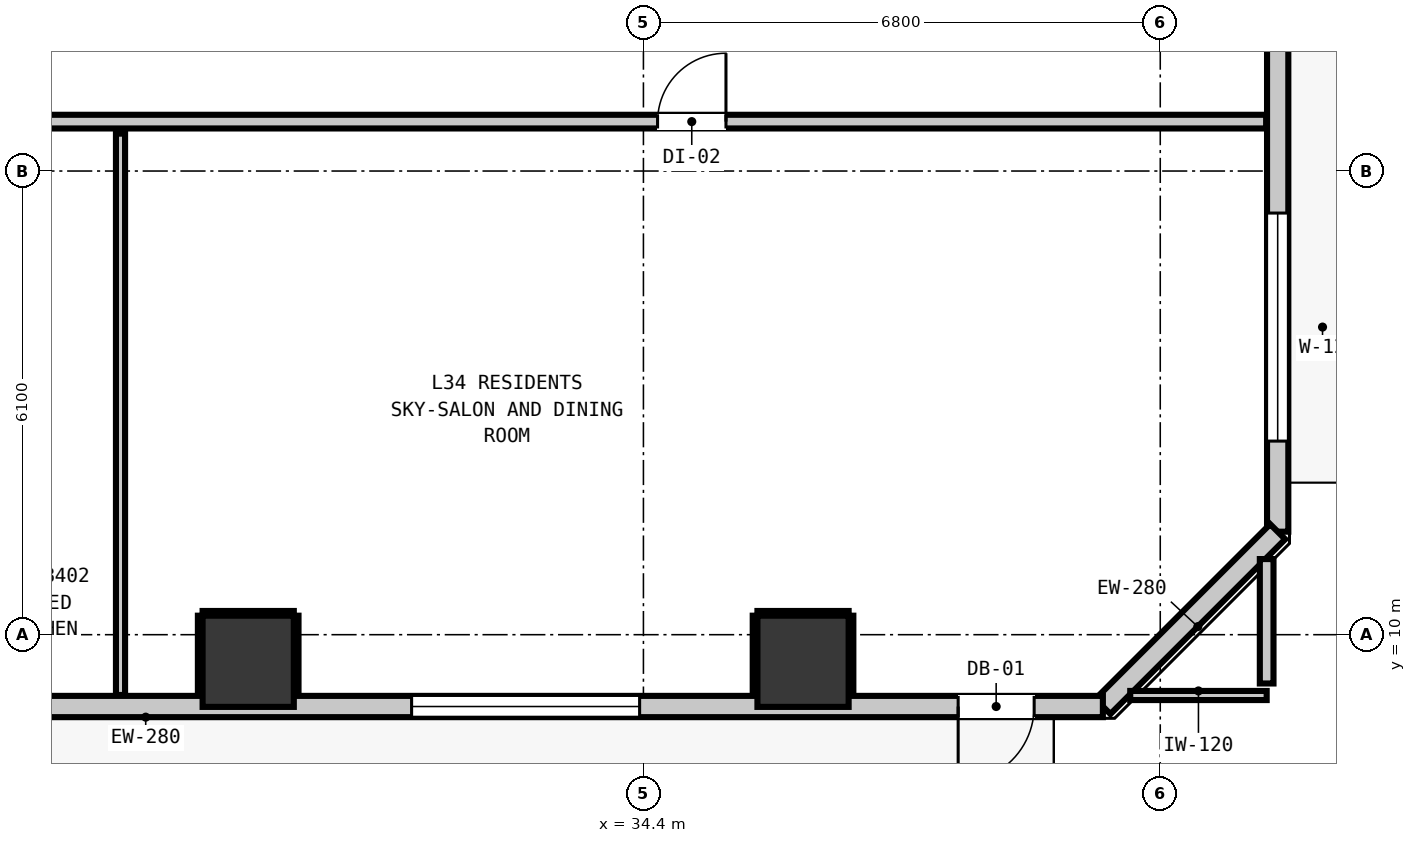
"""IFC4 building model, lengths in metres.
Left out: names, types, materials, properties, quantities, classifications, styles, units other than length and angle.
Written with IfcOpenShell. Run it as: python <this file> out.ifc"""

import sys

from ifc_helpers import new_model, si_unit, direction, frame, frame_2d, origin, origin_2d, place, context, subcontext, project, spatial, rectangle, extrude, element, fill, save


model = new_model("IFC4")
c1 = context("Model", 3, precision=1e-05, world=origin(), true_north=direction((0.0, 1.0)))
c2 = subcontext(c1, "Body", "Model", "MODEL_VIEW")
j1 = project(units=[si_unit("LENGTHUNIT", "METRE"), si_unit("PLANEANGLEUNIT", "RADIAN")], contexts=[c1])
p1 = place(None, origin())
s1 = spatial("IfcSite", under=j1, at=p1, CompositionType="ELEMENT")
p2 = place(p1, origin())
s2 = spatial("IfcBuilding", under=s1, at=p2, CompositionType="ELEMENT")
p3 = place(p2, frame((0.0, 0.0, 119.36)))
s3 = spatial("IfcBuildingStorey", under=s2, at=p3, CompositionType="ELEMENT", Elevation=119.36)
for number, where, z_axis, x_axis in (
    (1, (29.2, 9.65, 0.0), (0.0, 0.0, 1.0), (1.0, 0.0, 0.0)),
    (2, (36.5, 9.65, 0.0), (0.0, 0.0, 1.0), (1.0, 0.0, 0.0)),
):
    element("IfcColumn", number, at=place(p3, frame(where, z_axis=z_axis, x_axis=x_axis)), inside=s3, PredefinedType="COLUMN", context=c2, shape_type="SweptSolid", body=[
        extrude(rectangle(XDim=1.2, YDim=1.2, at=origin_2d()), origin(), (0.0, 0.0, 1.0), 3.32),
    ])
p4 = place(p3, frame((42.745, 43.645, 0.0), z_axis=(0.0, 0.0, 1.0), x_axis=(0.0, -1.0, 0.0)))
e3 = element("IfcWall", 3, at=p4, inside=s3, PredefinedType="STANDARD", context=c2, shape_type="SweptSolid", body=[
    extrude(rectangle(XDim=32.29, YDim=0.28, at=frame_2d((16.145, 0.0))), origin(), (0.0, 0.0, 1.0), 3.08),
])
p5 = place(p4, frame((5.467, 0.0, 0.0)))
e4 = element("IfcOpeningElement", 4, at=p5, cuts=e3, PredefinedType="OPENING", context=c2, shape_type="SweptSolid", body=[
    extrude(rectangle(XDim=1.0, YDim=2.15, at=frame_2d((0.5, 1.075))), frame((0.0, 0.15, 0.0), z_axis=(0.0, -1.0, 0.0), x_axis=(1.0, 0.0, 0.0)), (0.0, 0.0, 1.0), 0.3),
])
p6 = place(p4, frame((28.098, 0.0, 0.85)))
e5 = element("IfcOpeningElement", 5, at=p6, cuts=e3, PredefinedType="OPENING", context=c2, shape_type="SweptSolid", body=[
    extrude(rectangle(XDim=3.0, YDim=2.1, at=frame_2d((1.5, 1.05))), frame((0.0, 0.15, 0.0), z_axis=(0.0, -1.0, 0.0), x_axis=(1.0, 0.0, 0.0)), (0.0, 0.0, 1.0), 0.3),
])
p7 = place(p4, frame((0.318, 0.0, 0.85)))
e6 = element("IfcOpeningElement", 6, at=p7, cuts=e3, PredefinedType="OPENING", context=c2, shape_type="SweptSolid", body=[
    extrude(rectangle(XDim=1.05, YDim=1.65, at=frame_2d((0.525, 0.825))), frame((0.0, 0.15, 0.0), z_axis=(0.0, -1.0, 0.0), x_axis=(1.0, 0.0, 0.0)), (0.0, 0.0, 1.0), 0.3),
])
p8 = place(p4, frame((14.883, 0.0, 0.85)))
e7 = element("IfcOpeningElement", 7, at=p8, cuts=e3, PredefinedType="OPENING", context=c2, shape_type="SweptSolid", body=[
    extrude(rectangle(XDim=3.0, YDim=2.1, at=frame_2d((1.5, 1.05))), frame((0.0, 0.15, 0.0), z_axis=(0.0, -1.0, 0.0), x_axis=(1.0, 0.0, 0.0)), (0.0, 0.0, 1.0), 0.3),
])
p9 = place(p3, frame((42.745, 11.355, 0.0), z_axis=(0.0, 0.0, 1.0), x_axis=(-0.707106781187, -0.707106781187, 0.0)))
e8 = element("IfcWall", 8, at=p9, inside=s3, PredefinedType="STANDARD", context=c2, shape_type="SweptSolid", body=[
    extrude(rectangle(XDim=3.253, YDim=0.28, at=frame_2d((1.626, 0.0))), origin(), (0.0, 0.0, 1.0), 3.08),
])
p10 = place(p3, frame((40.445, 9.055, 0.0), z_axis=(0.0, 0.0, 1.0), x_axis=(-1.0, 0.0, 0.0)))
e9 = element("IfcWall", 9, at=p10, inside=s3, PredefinedType="STANDARD", context=c2, shape_type="SweptSolid", body=[
    extrude(rectangle(XDim=35.09, YDim=0.28, at=frame_2d((17.545, 0.0))), origin(), (0.0, 0.0, 1.0), 3.08),
])
p11 = place(p10, frame((0.904, 0.0, 0.0)))
e10 = element("IfcOpeningElement", 10, at=p11, cuts=e9, PredefinedType="OPENING", context=c2, shape_type="SweptSolid", body=[
    extrude(rectangle(XDim=1.0, YDim=2.15, at=frame_2d((0.5, 1.075))), frame((0.0, 0.15, 0.0), z_axis=(0.0, -1.0, 0.0), x_axis=(1.0, 0.0, 0.0)), (0.0, 0.0, 1.0), 0.3),
])
p12 = place(p10, frame((29.442, 0.0, 0.85)))
e11 = element("IfcOpeningElement", 11, at=p12, cuts=e9, PredefinedType="OPENING", context=c2, shape_type="SweptSolid", body=[
    extrude(rectangle(XDim=3.0, YDim=2.1, at=frame_2d((1.5, 1.05))), frame((0.0, 0.15, 0.0), z_axis=(0.0, -1.0, 0.0), x_axis=(1.0, 0.0, 0.0)), (0.0, 0.0, 1.0), 0.3),
])
p13 = place(p10, frame((33.654, 0.0, 0.85)))
e12 = element("IfcOpeningElement", 12, at=p13, cuts=e9, PredefinedType="OPENING", context=c2, shape_type="SweptSolid", body=[
    extrude(rectangle(XDim=1.05, YDim=1.65, at=frame_2d((0.525, 0.825))), frame((0.0, 0.15, 0.0), z_axis=(0.0, -1.0, 0.0), x_axis=(1.0, 0.0, 0.0)), (0.0, 0.0, 1.0), 0.3),
])
p14 = place(p10, frame((16.092, 0.0, 0.85)))
e13 = element("IfcOpeningElement", 13, at=p14, cuts=e9, PredefinedType="OPENING", context=c2, shape_type="SweptSolid", body=[
    extrude(rectangle(XDim=1.05, YDim=1.65, at=frame_2d((0.525, 0.825))), frame((0.0, 0.15, 0.0), z_axis=(0.0, -1.0, 0.0), x_axis=(1.0, 0.0, 0.0)), (0.0, 0.0, 1.0), 0.3),
])
p15 = place(p10, frame((20.765, 0.0, 0.85)))
e14 = element("IfcOpeningElement", 14, at=p15, cuts=e9, PredefinedType="OPENING", context=c2, shape_type="SweptSolid", body=[
    extrude(rectangle(XDim=3.0, YDim=2.1, at=frame_2d((1.5, 1.05))), frame((0.0, 0.15, 0.0), z_axis=(0.0, -1.0, 0.0), x_axis=(1.0, 0.0, 0.0)), (0.0, 0.0, 1.0), 0.3),
])
p16 = place(p10, frame((6.095, 0.0, 0.85)))
e15 = element("IfcOpeningElement", 15, at=p16, cuts=e9, PredefinedType="OPENING", context=c2, shape_type="SweptSolid", body=[
    extrude(rectangle(XDim=3.0, YDim=2.1, at=frame_2d((1.5, 1.05))), frame((0.0, 0.15, 0.0), z_axis=(0.0, -1.0, 0.0), x_axis=(1.0, 0.0, 0.0)), (0.0, 0.0, 1.0), 0.3),
])
p17 = place(p3, frame((3.207, 16.75, 0.0), z_axis=(0.0, 0.0, 1.0), x_axis=(1.0, 0.0, 0.0)))
e16 = element("IfcWall", 16, at=p17, inside=s3, PredefinedType="PARTITIONING", context=c2, shape_type="SweptSolid", body=[
    extrude(rectangle(XDim=39.386, YDim=0.18, at=frame_2d((19.693, 0.0))), origin(), (0.0, 0.0, 1.0), 3.08),
])
p18 = place(p17, frame((5.797, 0.0, 0.0)))
e17 = element("IfcOpeningElement", 17, at=p18, cuts=e16, PredefinedType="OPENING", context=c2, shape_type="SweptSolid", body=[
    extrude(rectangle(XDim=1.0, YDim=2.15, at=frame_2d((0.5, 1.075))), frame((0.0, 0.1, 0.0), z_axis=(0.0, -1.0, 0.0), x_axis=(1.0, 0.0, 0.0)), (0.0, 0.0, 1.0), 0.2),
])
p19 = place(p17, frame((20.121, 0.0, 0.0)))
e18 = element("IfcOpeningElement", 18, at=p19, cuts=e16, PredefinedType="OPENING", context=c2, shape_type="SweptSolid", body=[
    extrude(rectangle(XDim=1.0, YDim=2.15, at=frame_2d((0.5, 1.075))), frame((0.0, 0.1, 0.0), z_axis=(0.0, -1.0, 0.0), x_axis=(1.0, 0.0, 0.0)), (0.0, 0.0, 1.0), 0.2),
])
p20 = place(p17, frame((31.379, 0.0, 0.0)))
e19 = element("IfcOpeningElement", 19, at=p20, cuts=e16, PredefinedType="OPENING", context=c2, shape_type="SweptSolid", body=[
    extrude(rectangle(XDim=0.9, YDim=2.1, at=frame_2d((0.45, 1.05))), frame((0.0, 0.1, 0.0), z_axis=(0.0, -1.0, 0.0), x_axis=(1.0, 0.0, 0.0)), (0.0, 0.0, 1.0), 0.2),
])
p21 = place(p3, frame((40.805, 9.2, 0.0), z_axis=(0.0, 0.0, 1.0), x_axis=(1.0, 0.0, 0.0)))
e20 = element("IfcWall", 20, at=p21, inside=s3, PredefinedType="PARTITIONING", context=c2, shape_type="SweptSolid", body=[
    extrude(rectangle(XDim=1.795, YDim=0.12, at=frame_2d((0.897, 0.0))), origin(), (0.0, 0.0, 1.0), 3.08),
])
p22 = place(p3, frame((42.6, 9.358, 0.0), z_axis=(0.0, 0.0, 1.0), x_axis=(0.0, 1.0, 0.0)))
e21 = element("IfcWall", 21, at=p22, inside=s3, PredefinedType="PARTITIONING", context=c2, shape_type="SweptSolid", body=[
    extrude(rectangle(XDim=1.637, YDim=0.18, at=frame_2d((0.819, 0.0))), origin(), (0.0, 0.0, 1.0), 3.08),
])
p23 = place(p3, frame((27.52, 9.207, 0.0), z_axis=(0.0, 0.0, 1.0), x_axis=(0.0, 1.0, 0.0)))
e22 = element("IfcWall", 22, at=p23, inside=s3, PredefinedType="PARTITIONING", context=c2, shape_type="SweptSolid", body=[
    extrude(rectangle(XDim=7.385, YDim=0.12, at=frame_2d((3.692, 0.0))), origin(), (0.0, 0.0, 1.0), 3.08),
])
p24 = place(p3, frame((28.6, 10.282, 0.0), z_axis=(0.0, 0.0, 1.0), x_axis=(1.0, 0.0, 0.0)))
e23 = element("IfcWall", 23, at=p24, inside=s3, PredefinedType="PARTITIONING", context=c2, shape_type="SweptSolid", body=[
    extrude(rectangle(XDim=1.2, YDim=0.06, at=frame_2d((0.6, 0.0))), origin(), (0.0, 0.0, 1.0), 1.45),
])
for number, where, z_axis, x_axis in (
    (24, (28.568, 9.21, 0.0), (0.0, 0.0, 1.0), (0.0, 1.0, 0.0)),
    (25, (29.832, 9.21, 0.0), (0.0, 0.0, 1.0), (0.0, 1.0, 0.0)),
):
    element("IfcWall", number, at=place(p3, frame(where, z_axis=z_axis, x_axis=x_axis)), inside=s3, PredefinedType="PARTITIONING", context=c2, shape_type="SweptSolid", body=[
        extrude(rectangle(XDim=1.04, YDim=0.06, at=frame_2d((0.52, 0.0))), origin(), (0.0, 0.0, 1.0), 1.45),
    ])
p25 = place(p3, frame((35.9, 10.282, 0.0), z_axis=(0.0, 0.0, 1.0), x_axis=(1.0, 0.0, 0.0)))
e26 = element("IfcWall", 26, at=p25, inside=s3, PredefinedType="PARTITIONING", context=c2, shape_type="SweptSolid", body=[
    extrude(rectangle(XDim=1.2, YDim=0.06, at=frame_2d((0.6, 0.0))), origin(), (0.0, 0.0, 1.0), 1.45),
])
for number, where, z_axis, x_axis in (
    (27, (35.868, 9.21, 0.0), (0.0, 0.0, 1.0), (0.0, 1.0, 0.0)),
    (28, (37.132, 9.21, 0.0), (0.0, 0.0, 1.0), (0.0, 1.0, 0.0)),
):
    element("IfcWall", number, at=place(p3, frame(where, z_axis=z_axis, x_axis=x_axis)), inside=s3, PredefinedType="PARTITIONING", context=c2, shape_type="SweptSolid", body=[
        extrude(rectangle(XDim=1.04, YDim=0.06, at=frame_2d((0.52, 0.0))), origin(), (0.0, 0.0, 1.0), 1.45),
    ])
p26 = place(p11, origin())
e29 = element("IfcDoor", 29, at=p26, inside=s3, OperationType="SINGLE_SWING_RIGHT", PredefinedType="DOOR", context=c2, shape_type="SweptSolid", body=[
    extrude(rectangle(XDim=1.0, YDim=2.15, at=frame_2d((0.5, 1.075))), frame((0.0, 0.025, 0.0), z_axis=(0.0, -1.0, 0.0), x_axis=(1.0, 0.0, 0.0)), (0.0, 0.0, 1.0), 0.05),
])
fill(e10, e29)
p27 = place(p6, origin())
e30 = element("IfcWindow", 30, at=p27, inside=s3, PartitioningType="SINGLE_PANEL", PredefinedType="WINDOW", context=c2, shape_type="SweptSolid", body=[
    extrude(rectangle(XDim=3.0, YDim=2.1, at=frame_2d((1.5, 1.05))), frame((0.0, 0.03, 0.0), z_axis=(0.0, -1.0, 0.0), x_axis=(1.0, 0.0, 0.0)), (0.0, 0.0, 1.0), 0.06),
])
fill(e5, e30)
p28 = place(p16, origin())
e31 = element("IfcWindow", 31, at=p28, inside=s3, PartitioningType="SINGLE_PANEL", PredefinedType="WINDOW", context=c2, shape_type="SweptSolid", body=[
    extrude(rectangle(XDim=3.0, YDim=2.1, at=frame_2d((1.5, 1.05))), frame((0.0, 0.03, 0.0), z_axis=(0.0, -1.0, 0.0), x_axis=(1.0, 0.0, 0.0)), (0.0, 0.0, 1.0), 0.06),
])
fill(e15, e31)
p29 = place(p20, origin())
e32 = element("IfcDoor", 32, at=p29, inside=s3, OperationType="SINGLE_SWING_RIGHT", PredefinedType="DOOR", context=c2, shape_type="SweptSolid", body=[
    extrude(rectangle(XDim=0.9, YDim=2.1, at=frame_2d((0.45, 1.05))), frame((0.0, 0.025, 0.0), z_axis=(0.0, -1.0, 0.0), x_axis=(1.0, 0.0, 0.0)), (0.0, 0.0, 1.0), 0.05),
])
fill(e19, e32)
save(model, sys.argv[1])
